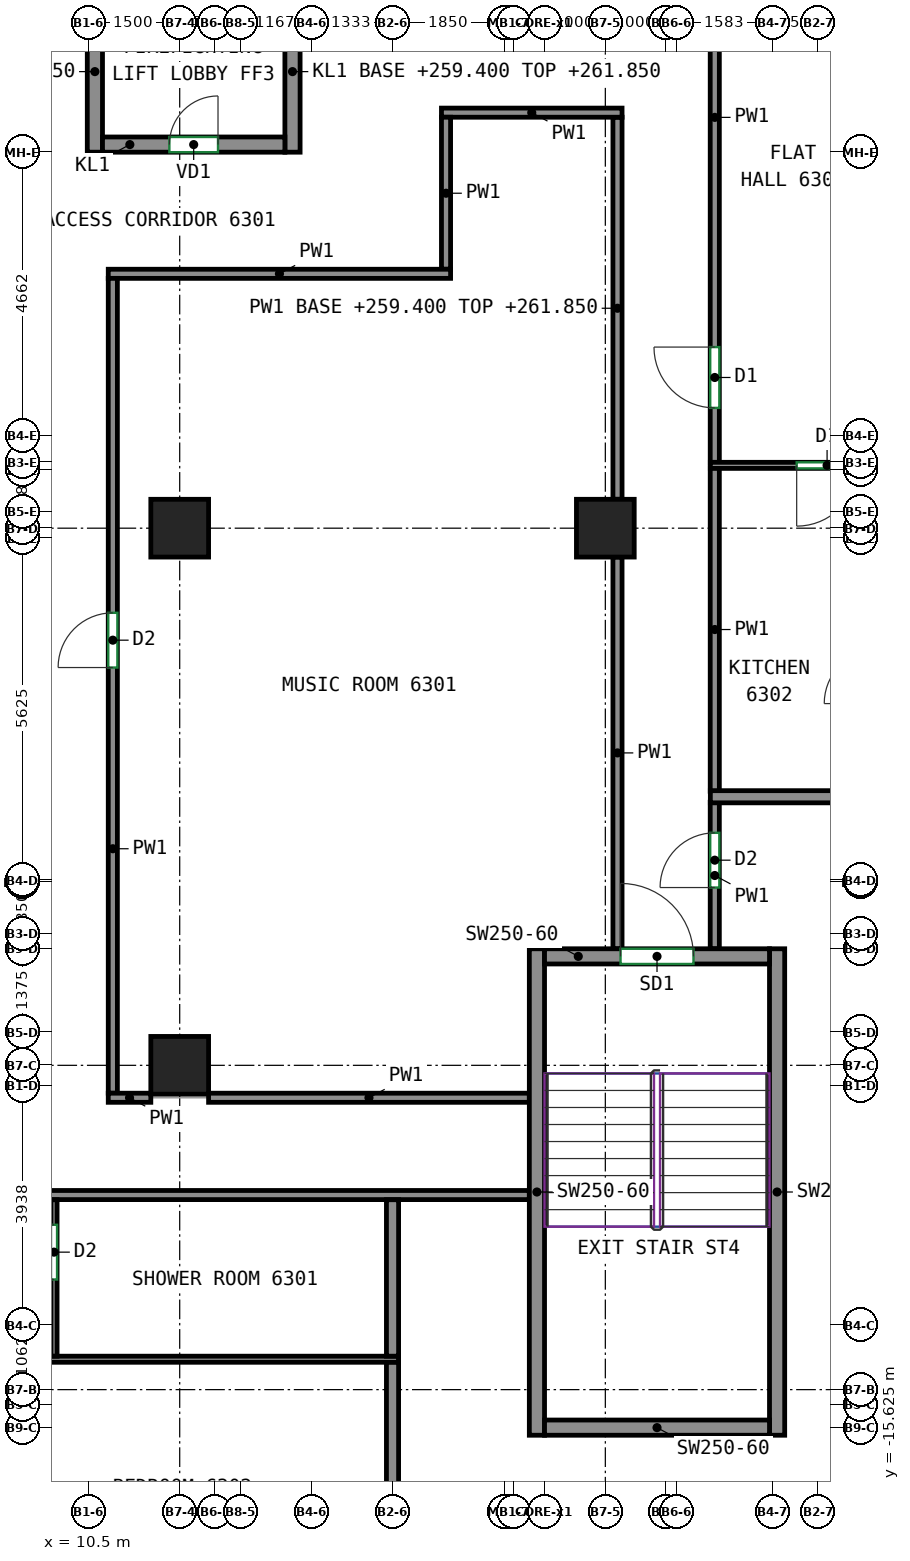
"""IFC4 building model, lengths in metres.
Left out: names, types, materials, properties, quantities, classifications, styles, units other than length and angle.
Written with IfcOpenShell. Run it as: python <this file> out.ifc"""

import sys

from ifc_helpers import new_model, si_unit, direction, frame, frame_2d, origin, origin_2d, place, context, subcontext, project, spatial, rectangle, extrude, source, transform, mapped, element, fill, save


model = new_model("IFC4")
c1 = context("Model", 3, precision=1e-05, world=origin(), true_north=direction((0.0, 1.0)))
c2 = subcontext(c1, "Body", "Model", "MODEL_VIEW")
j1 = project(units=[si_unit("LENGTHUNIT", "METRE"), si_unit("PLANEANGLEUNIT", "RADIAN")], contexts=[c1])
p1 = place(None, origin())
s1 = spatial("IfcSite", under=j1, at=p1, CompositionType="ELEMENT")
p2 = place(p1, origin())
s2 = spatial("IfcBuilding", under=s1, at=p2, CompositionType="ELEMENT")
p3 = place(p2, frame((0.0, 0.0, 259.4)))
s3 = spatial("IfcBuildingStorey", under=s2, at=p3, CompositionType="ELEMENT", Elevation=259.4)
m1 = source(origin(), c2, "Body", "SweptSolid", [
    extrude(rectangle(XDim=0.95, YDim=0.95, at=origin_2d()), origin(), (0.0, 0.0, 1.0), 3.0),
])
for number, where, z_axis, x_axis in (
    (1, (12.0, -9.667, 0.0), (0.0, 0.0, 1.0), (1.0, 0.0, 0.0)),
    (2, (12.0, -0.833, 0.0), (0.0, 0.0, 1.0), (1.0, 0.0, 0.0)),
    (3, (19.0, -0.833, 0.0), (0.0, 0.0, 1.0), (1.0, 0.0, 0.0)),
):
    element("IfcColumn", number, at=place(p3, frame(where, z_axis=z_axis, x_axis=x_axis)), inside=s3, PredefinedType="COLUMN", context=c2, shape_type="MappedRepresentation", body=[
        mapped(m1, transform((0.0, 0.0, 0.0))),
    ])
m2 = source(origin(), c2, "Body", "SweptSolid", [
    extrude(rectangle(XDim=8.0, YDim=0.25, at=frame_2d((4.0, 0.0))), origin(), (0.0, 0.0, 1.0), 3.0),
])
for number, where, z_axis, x_axis in (
    (4, (17.875, -15.75, 0.0), (0.0, 0.0, 1.0), (0.0, 1.0, 0.0)),
    (5, (21.825, -15.75, 0.0), (0.0, 0.0, 1.0), (0.0, 1.0, 0.0)),
):
    element("IfcWall", number, at=place(p3, frame(where, z_axis=z_axis, x_axis=x_axis)), inside=s3, PredefinedType="SHEAR", context=c2, shape_type="MappedRepresentation", body=[
        mapped(m2, transform((0.0, 0.0, 0.0))),
    ])
m3 = source(origin(), c2, "Body", "SweptSolid", [
    extrude(rectangle(XDim=3.7, YDim=0.25, at=frame_2d((1.85, 0.0))), origin(), (0.0, 0.0, 1.0), 3.0),
])
p4 = place(p3, frame((18.0, -15.625, 0.0), z_axis=(0.0, 0.0, 1.0), x_axis=(1.0, 0.0, 0.0)))
e6 = element("IfcWall", 6, at=p4, inside=s3, PredefinedType="SHEAR", context=c2, shape_type="MappedRepresentation", body=[
    mapped(m3, transform((0.0, 0.0, 0.0))),
])
p5 = place(p3, frame((18.0, -7.875, 0.0), z_axis=(0.0, 0.0, 1.0), x_axis=(1.0, 0.0, 0.0)))
e7 = element("IfcWall", 7, at=p5, inside=s3, PredefinedType="SHEAR", context=c2, shape_type="MappedRepresentation", body=[
    mapped(m3, transform((0.0, 0.0, 0.0))),
])
p6 = place(p5, frame((1.25, 0.0, 0.0)))
e8 = element("IfcOpeningElement", 8, at=p6, cuts=e7, PredefinedType="OPENING", context=c2, shape_type="SweptSolid", body=[
    extrude(rectangle(XDim=1.2, YDim=2.1, at=frame_2d((0.6, 1.05))), frame((0.0, 0.135, 0.0), z_axis=(0.0, -1.0, 0.0), x_axis=(1.0, 0.0, 0.0)), (0.0, 0.0, 1.0), 0.27),
])
m4 = source(origin(), c2, "Body", "SweptSolid", [
    extrude(rectangle(XDim=2.65, YDim=0.25, at=frame_2d((1.325, 0.0))), origin(), (0.0, 0.0, 1.0), 2.45),
])
for number, where, z_axis, x_axis in (
    (9, (10.605, 5.35, 0.0), (0.0, 0.0, 1.0), (0.0, 1.0, 0.0)),
    (10, (13.855, 5.35, 0.0), (0.0, 0.0, 1.0), (0.0, 1.0, 0.0)),
):
    element("IfcWall", number, at=place(p3, frame(where, z_axis=z_axis, x_axis=x_axis)), inside=s3, PredefinedType="PARTITIONING", context=c2, shape_type="MappedRepresentation", body=[
        mapped(m4, transform((0.0, 0.0, 0.0))),
    ])
m5 = source(origin(), c2, "Body", "SweptSolid", [
    extrude(rectangle(XDim=3.0, YDim=0.25, at=frame_2d((1.5, 0.0))), origin(), (0.0, 0.0, 1.0), 3.0),
])
p7 = place(p3, frame((10.73, 5.475, 0.0), z_axis=(0.0, 0.0, 1.0), x_axis=(1.0, 0.0, 0.0)))
e11 = element("IfcWall", 11, at=p7, inside=s3, PredefinedType="PARTITIONING", context=c2, shape_type="MappedRepresentation", body=[
    mapped(m5, transform((0.0, 0.0, 0.0))),
])
p8 = place(p7, frame((1.1, 0.0, 0.0)))
e12 = element("IfcOpeningElement", 12, at=p8, cuts=e11, PredefinedType="OPENING", context=c2, shape_type="SweptSolid", body=[
    extrude(rectangle(XDim=0.8, YDim=2.0, at=frame_2d((0.4, 1.0))), frame((0.0, 0.135, 0.0), z_axis=(0.0, -1.0, 0.0), x_axis=(1.0, 0.0, 0.0)), (0.0, 0.0, 1.0), 0.27),
])
p9 = place(p3, frame((-11.8, -11.8, 0.0), z_axis=(0.0, 0.0, 1.0), x_axis=(1.0, 0.0, 0.0)))
e13 = element("IfcWall", 13, at=p9, inside=s3, PredefinedType="PARTITIONING", context=c2, shape_type="SweptSolid", body=[
    extrude(rectangle(XDim=29.55, YDim=0.15, at=frame_2d((14.775, 0.0))), origin(), (0.0, 0.0, 1.0), 3.0),
])
p10 = place(p9, frame((8.26, 0.0, 0.0)))
e14 = element("IfcOpeningElement", 14, at=p10, cuts=e13, PredefinedType="OPENING", context=c2, shape_type="SweptSolid", body=[
    extrude(rectangle(XDim=1.0, YDim=2.1, at=frame_2d((0.5, 1.05))), frame((0.0, 0.085, 0.0), z_axis=(0.0, -1.0, 0.0), x_axis=(1.0, 0.0, 0.0)), (0.0, 0.0, 1.0), 0.17),
])
p11 = place(p3, frame((20.8, -7.75, 0.0), z_axis=(0.0, 0.0, 1.0), x_axis=(0.0, 1.0, 0.0)))
e15 = element("IfcWall", 15, at=p11, inside=s3, PredefinedType="PARTITIONING", context=c2, shape_type="SweptSolid", body=[
    extrude(rectangle(XDim=2.41, YDim=0.15, at=frame_2d((1.205, 0.0))), origin(), (0.0, 0.0, 1.0), 3.0),
])
p12 = place(p11, frame((1.007, 0.0, 0.0)))
e16 = element("IfcOpeningElement", 16, at=p12, cuts=e15, PredefinedType="OPENING", context=c2, shape_type="SweptSolid", body=[
    extrude(rectangle(XDim=0.9, YDim=2.1, at=frame_2d((0.45, 1.05))), frame((0.0, 0.085, 0.0), z_axis=(0.0, -1.0, 0.0), x_axis=(1.0, 0.0, 0.0)), (0.0, 0.0, 1.0), 0.17),
])
p13 = place(p3, frame((20.8, -5.16, 0.0), z_axis=(0.0, 0.0, 1.0), x_axis=(0.0, 1.0, 0.0)))
e17 = element("IfcWall", 17, at=p13, inside=s3, PredefinedType="PARTITIONING", context=c2, shape_type="SweptSolid", body=[
    extrude(rectangle(XDim=5.32, YDim=0.15, at=frame_2d((2.66, 0.0))), origin(), (0.0, 0.0, 1.0), 3.0),
])
p14 = place(p3, frame((20.8, 0.24, 0.0), z_axis=(0.0, 0.0, 1.0), x_axis=(0.0, 1.0, 0.0)))
e18 = element("IfcWall", 18, at=p14, inside=s3, PredefinedType="PARTITIONING", context=c2, shape_type="SweptSolid", body=[
    extrude(rectangle(XDim=11.365, YDim=0.15, at=frame_2d((5.683, 0.0))), origin(), (0.0, 0.0, 1.0), 3.0),
])
p15 = place(p14, frame((0.905, 0.0, 0.0)))
e19 = element("IfcOpeningElement", 19, at=p15, cuts=e18, PredefinedType="OPENING", context=c2, shape_type="SweptSolid", body=[
    extrude(rectangle(XDim=1.0, YDim=2.1, at=frame_2d((0.5, 1.05))), frame((0.0, 0.085, 0.0), z_axis=(0.0, -1.0, 0.0), x_axis=(1.0, 0.0, 0.0)), (0.0, 0.0, 1.0), 0.17),
])
p16 = place(p3, frame((19.2, -7.75, 0.0), z_axis=(0.0, 0.0, 1.0), x_axis=(0.0, 1.0, 0.0)))
e20 = element("IfcWall", 20, at=p16, inside=s3, PredefinedType="PARTITIONING", context=c2, shape_type="SweptSolid", body=[
    extrude(rectangle(XDim=6.442, YDim=0.15, at=frame_2d((3.221, 0.0))), origin(), (0.0, 0.0, 1.0), 3.0),
])
p17 = place(p3, frame((19.2, -0.358, 0.0), z_axis=(0.0, 0.0, 1.0), x_axis=(0.0, 1.0, 0.0)))
e21 = element("IfcWall", 21, at=p17, inside=s3, PredefinedType="PARTITIONING", context=c2, shape_type="SweptSolid", body=[
    extrude(rectangle(XDim=6.283, YDim=0.15, at=frame_2d((3.142, 0.0))), origin(), (0.0, 0.0, 1.0), 2.45),
])
p18 = place(p3, frame((16.305, 6.0, 0.0), z_axis=(0.0, 0.0, 1.0), x_axis=(1.0, 0.0, 0.0)))
e22 = element("IfcWall", 22, at=p18, inside=s3, PredefinedType="PARTITIONING", context=c2, shape_type="SweptSolid", body=[
    extrude(rectangle(XDim=2.97, YDim=0.15, at=frame_2d((1.485, 0.0))), origin(), (0.0, 0.0, 1.0), 3.0),
])
p19 = place(p3, frame((16.38, 3.425, 0.0), z_axis=(0.0, 0.0, 1.0), x_axis=(0.0, 1.0, 0.0)))
e23 = element("IfcWall", 23, at=p19, inside=s3, PredefinedType="PARTITIONING", context=c2, shape_type="SweptSolid", body=[
    extrude(rectangle(XDim=2.5, YDim=0.15, at=frame_2d((1.25, 0.0))), origin(), (0.0, 0.0, 1.0), 3.0),
])
p20 = place(p3, frame((10.825, 3.35, 0.0), z_axis=(0.0, 0.0, 1.0), x_axis=(1.0, 0.0, 0.0)))
e24 = element("IfcWall", 24, at=p20, inside=s3, PredefinedType="PARTITIONING", context=c2, shape_type="SweptSolid", body=[
    extrude(rectangle(XDim=5.63, YDim=0.15, at=frame_2d((2.815, 0.0))), origin(), (0.0, 0.0, 1.0), 3.0),
])
p21 = place(p3, frame((10.9, -10.125, 0.0), z_axis=(0.0, 0.0, 1.0), x_axis=(0.0, 1.0, 0.0)))
e25 = element("IfcWall", 25, at=p21, inside=s3, PredefinedType="PARTITIONING", context=c2, shape_type="SweptSolid", body=[
    extrude(rectangle(XDim=13.4, YDim=0.15, at=frame_2d((6.7, 0.0))), origin(), (0.0, 0.0, 1.0), 3.0),
])
p22 = place(p21, frame((7.0, 0.0, 0.0)))
e26 = element("IfcOpeningElement", 26, at=p22, cuts=e25, PredefinedType="OPENING", context=c2, shape_type="SweptSolid", body=[
    extrude(rectangle(XDim=0.9, YDim=2.1, at=frame_2d((0.45, 1.05))), frame((0.0, 0.085, 0.0), z_axis=(0.0, -1.0, 0.0), x_axis=(1.0, 0.0, 0.0)), (0.0, 0.0, 1.0), 0.17),
])
p23 = place(p3, frame((12.475, -10.2, 0.0), z_axis=(0.0, 0.0, 1.0), x_axis=(1.0, 0.0, 0.0)))
e27 = element("IfcWall", 27, at=p23, inside=s3, PredefinedType="PARTITIONING", context=c2, shape_type="SweptSolid", body=[
    extrude(rectangle(XDim=5.275, YDim=0.15, at=frame_2d((2.637, 0.0))), origin(), (0.0, 0.0, 1.0), 3.0),
])
p24 = place(p3, frame((10.825, -10.2, 0.0), z_axis=(0.0, 0.0, 1.0), x_axis=(1.0, 0.0, 0.0)))
e28 = element("IfcWall", 28, at=p24, inside=s3, PredefinedType="PARTITIONING", context=c2, shape_type="SweptSolid", body=[
    extrude(rectangle(XDim=0.7, YDim=0.15, at=frame_2d((0.35, 0.0))), origin(), (0.0, 0.0, 1.0), 3.0),
])
p25 = place(p3, frame((-9.1, -14.5, 0.0), z_axis=(0.0, 0.0, 1.0), x_axis=(1.0, 0.0, 0.0)))
e29 = element("IfcWall", 29, at=p25, inside=s3, PredefinedType="PARTITIONING", context=c2, shape_type="SweptSolid", body=[
    extrude(rectangle(XDim=24.7, YDim=0.1, at=frame_2d((12.35, 0.0))), origin(), (0.0, 0.0, 1.0), 3.0),
])
p26 = place(p25, frame((1.763, 0.0, 0.0)))
e30 = element("IfcOpeningElement", 30, at=p26, cuts=e29, PredefinedType="OPENING", context=c2, shape_type="SweptSolid", body=[
    extrude(rectangle(XDim=1.0, YDim=2.1, at=frame_2d((0.5, 1.05))), frame((0.0, 0.06, 0.0), z_axis=(0.0, -1.0, 0.0), x_axis=(1.0, 0.0, 0.0)), (0.0, 0.0, 1.0), 0.12),
])
p27 = place(p25, frame((12.055, 0.0, 0.0)))
e31 = element("IfcOpeningElement", 31, at=p27, cuts=e29, PredefinedType="OPENING", context=c2, shape_type="SweptSolid", body=[
    extrude(rectangle(XDim=1.0, YDim=2.1, at=frame_2d((0.5, 1.05))), frame((0.0, 0.06, 0.0), z_axis=(0.0, -1.0, 0.0), x_axis=(1.0, 0.0, 0.0)), (0.0, 0.0, 1.0), 0.12),
])
p28 = place(p3, frame((9.933, -14.45, 0.0), z_axis=(0.0, 0.0, 1.0), x_axis=(0.0, 1.0, 0.0)))
e32 = element("IfcWall", 32, at=p28, inside=s3, PredefinedType="PARTITIONING", context=c2, shape_type="SweptSolid", body=[
    extrude(rectangle(XDim=2.573, YDim=0.1, at=frame_2d((1.287, 0.0))), origin(), (0.0, 0.0, 1.0), 3.0),
])
p29 = place(p28, frame((1.261, 0.0, 0.0)))
e33 = element("IfcOpeningElement", 33, at=p29, cuts=e32, PredefinedType="OPENING", context=c2, shape_type="SweptSolid", body=[
    extrude(rectangle(XDim=0.9, YDim=2.1, at=frame_2d((0.45, 1.05))), frame((0.0, 0.06, 0.0), z_axis=(0.0, -1.0, 0.0), x_axis=(1.0, 0.0, 0.0)), (0.0, 0.0, 1.0), 0.12),
])
p30 = place(p3, frame((15.5, -14.45, 0.0), z_axis=(0.0, 0.0, 1.0), x_axis=(0.0, 1.0, 0.0)))
e34 = element("IfcWall", 34, at=p30, inside=s3, PredefinedType="PARTITIONING", context=c2, shape_type="SweptSolid", body=[
    extrude(rectangle(XDim=2.573, YDim=0.2, at=frame_2d((1.287, 0.0))), origin(), (0.0, 0.0, 1.0), 3.0),
])
p31 = place(p3, frame((15.5, -18.25, 0.0), z_axis=(0.0, 0.0, 1.0), x_axis=(0.0, 1.0, 0.0)))
e35 = element("IfcWall", 35, at=p31, inside=s3, PredefinedType="PARTITIONING", context=c2, shape_type="SweptSolid", body=[
    extrude(rectangle(XDim=3.698, YDim=0.2, at=frame_2d((1.849, 0.0))), origin(), (0.0, 0.0, 1.0), 3.0),
])
p32 = place(p3, frame((20.727, -5.25, 0.0), z_axis=(0.0, 0.0, 1.0), x_axis=(1.0, 0.0, 0.0)))
e36 = element("IfcWall", 36, at=p32, inside=s3, PredefinedType="PARTITIONING", context=c2, shape_type="SweptSolid", body=[
    extrude(rectangle(XDim=8.523, YDim=0.2, at=frame_2d((4.261, 0.0))), origin(), (0.0, 0.0, 1.0), 3.0),
])
p33 = place(p3, frame((23.55, 0.2, 0.0), z_axis=(0.0, 0.0, 1.0), x_axis=(-1.0, 0.0, 0.0)))
e37 = element("IfcWall", 37, at=p33, inside=s3, PredefinedType="PARTITIONING", context=c2, shape_type="SweptSolid", body=[
    extrude(rectangle(XDim=2.823, YDim=0.1, at=frame_2d((1.412, 0.0))), origin(), (0.0, 0.0, 1.0), 3.0),
])
p34 = place(p33, frame((0.403, 0.0, 0.0)))
e38 = element("IfcOpeningElement", 38, at=p34, cuts=e37, PredefinedType="OPENING", context=c2, shape_type="SweptSolid", body=[
    extrude(rectangle(XDim=1.0, YDim=2.1, at=frame_2d((0.5, 1.05))), frame((0.0, 0.06, 0.0), z_axis=(0.0, -1.0, 0.0), x_axis=(1.0, 0.0, 0.0)), (0.0, 0.0, 1.0), 0.12),
])
p35 = place(p8, origin())
e39 = element("IfcDoor", 39, at=p35, inside=s3, OperationType="SINGLE_SWING_RIGHT", PredefinedType="DOOR", context=c2, shape_type="SweptSolid", body=[
    extrude(rectangle(XDim=0.8, YDim=2.0, at=frame_2d((0.4, 1.0))), frame((0.0, 0.025, 0.0), z_axis=(0.0, -1.0, 0.0), x_axis=(1.0, 0.0, 0.0)), (0.0, 0.0, 1.0), 0.05),
])
fill(e12, e39)
p36 = place(p6, origin())
e40 = element("IfcDoor", 40, at=p36, inside=s3, OperationType="DOUBLE_DOOR_SINGLE_SWING", PredefinedType="DOOR", context=c2, shape_type="SweptSolid", body=[
    extrude(rectangle(XDim=1.2, YDim=2.1, at=frame_2d((0.6, 1.05))), frame((0.0, 0.025, 0.0), z_axis=(0.0, -1.0, 0.0), x_axis=(1.0, 0.0, 0.0)), (0.0, 0.0, 1.0), 0.05),
])
fill(e8, e40)
p37 = place(p29, origin())
e41 = element("IfcDoor", 41, at=p37, inside=s3, OperationType="SINGLE_SWING_LEFT", PredefinedType="DOOR", context=c2, shape_type="SweptSolid", body=[
    extrude(rectangle(XDim=0.9, YDim=2.1, at=frame_2d((0.45, 1.05))), frame((0.0, 0.025, 0.0), z_axis=(0.0, -1.0, 0.0), x_axis=(1.0, 0.0, 0.0)), (0.0, 0.0, 1.0), 0.05),
])
fill(e33, e41)
p38 = place(p12, origin())
e42 = element("IfcDoor", 42, at=p38, inside=s3, OperationType="SINGLE_SWING_LEFT", PredefinedType="DOOR", context=c2, shape_type="SweptSolid", body=[
    extrude(rectangle(XDim=0.9, YDim=2.1, at=frame_2d((0.45, 1.05))), frame((0.0, 0.025, 0.0), z_axis=(0.0, -1.0, 0.0), x_axis=(1.0, 0.0, 0.0)), (0.0, 0.0, 1.0), 0.05),
])
fill(e16, e42)
p39 = place(p22, origin())
e43 = element("IfcDoor", 43, at=p39, inside=s3, OperationType="SINGLE_SWING_LEFT", PredefinedType="DOOR", context=c2, shape_type="SweptSolid", body=[
    extrude(rectangle(XDim=0.9, YDim=2.1, at=frame_2d((0.45, 1.05))), frame((0.0, 0.025, 0.0), z_axis=(0.0, -1.0, 0.0), x_axis=(1.0, 0.0, 0.0)), (0.0, 0.0, 1.0), 0.05),
])
fill(e26, e43)
p40 = place(p34, origin())
e44 = element("IfcDoor", 44, at=p40, inside=s3, OperationType="SINGLE_SWING_RIGHT", PredefinedType="DOOR", context=c2, shape_type="SweptSolid", body=[
    extrude(rectangle(XDim=1.0, YDim=2.1, at=frame_2d((0.5, 1.05))), frame((0.0, 0.025, 0.0), z_axis=(0.0, -1.0, 0.0), x_axis=(1.0, 0.0, 0.0)), (0.0, 0.0, 1.0), 0.05),
])
fill(e38, e44)
p41 = place(p15, origin())
e45 = element("IfcDoor", 45, at=p41, inside=s3, OperationType="SINGLE_SWING_RIGHT", PredefinedType="DOOR", context=c2, shape_type="SweptSolid", body=[
    extrude(rectangle(XDim=1.0, YDim=2.1, at=frame_2d((0.5, 1.05))), frame((0.0, 0.025, 0.0), z_axis=(0.0, -1.0, 0.0), x_axis=(1.0, 0.0, 0.0)), (0.0, 0.0, 1.0), 0.05),
])
fill(e19, e45)
save(model, sys.argv[1])
